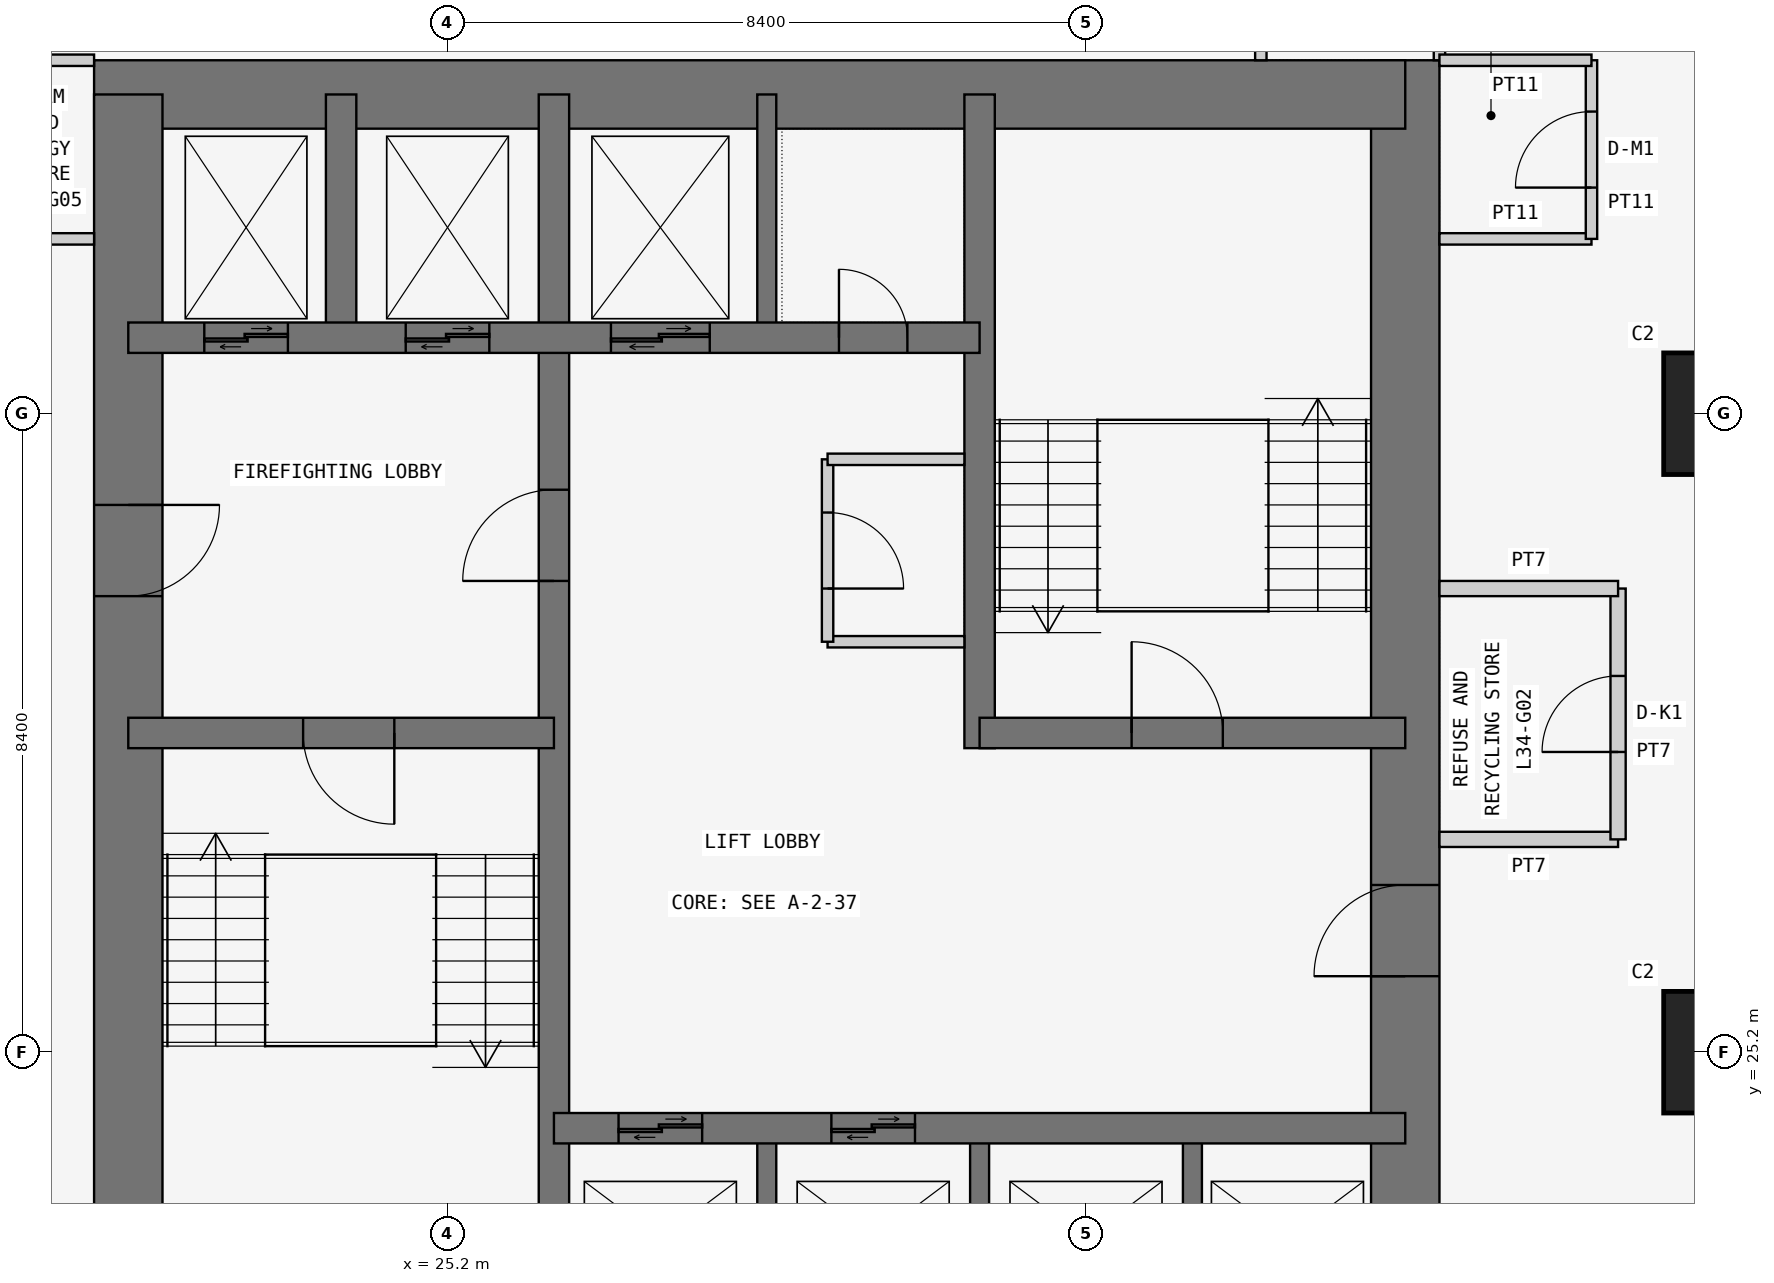
"""IFC4 building model, lengths in metres.
Left out: names, types, materials, properties, quantities, classifications, styles, units other than length and angle.
Written with IfcOpenShell. Run it as: python <this file> out.ifc"""

import sys

from ifc_helpers import new_model, si_unit, direction, frame, frame_2d, origin, origin_2d, place, context, subcontext, project, spatial, rectangle, extrude, element, fill, save


model = new_model("IFC4")
c1 = context("Model", 3, precision=1e-05, world=origin(), true_north=direction((0.0, 1.0)))
c2 = subcontext(c1, "Body", "Model", "MODEL_VIEW")
j1 = project(units=[si_unit("LENGTHUNIT", "METRE"), si_unit("PLANEANGLEUNIT", "RADIAN")], contexts=[c1])
p1 = place(None, origin())
s1 = spatial("IfcSite", under=j1, at=p1, CompositionType="ELEMENT")
p2 = place(p1, origin())
s2 = spatial("IfcBuilding", under=s1, at=p2, CompositionType="ELEMENT")
p3 = place(p2, frame((0.0, 0.0, 134.1)))
s3 = spatial("IfcBuildingStorey", under=s2, at=p3, CompositionType="ELEMENT", Elevation=134.1)
for number, where, z_axis, x_axis in (
    (1, (42.0, 25.2, 0.0), (0.0, 0.0, 1.0), (1.0, 0.0, 0.0)),
    (2, (42.0, 33.6, 0.0), (0.0, 0.0, 1.0), (1.0, 0.0, 0.0)),
):
    element("IfcColumn", number, at=place(p3, frame(where, z_axis=z_axis, x_axis=x_axis)), inside=s3, PredefinedType="COLUMN", context=c2, shape_type="SweptSolid", body=[
        extrude(rectangle(XDim=1.6, YDim=1.6, at=origin_2d()), origin(), (0.0, 0.0, 1.0), 3.6),
    ])
p4 = place(p3, frame((37.8, 21.0, 0.0), z_axis=(0.0, 0.0, 1.0), x_axis=(0.0, 1.0, 0.0)))
e3 = element("IfcWall", 3, at=p4, inside=s3, PredefinedType="SHEAR", context=c2, shape_type="SweptSolid", body=[
    extrude(rectangle(XDim=17.25, YDim=0.9, at=frame_2d((8.625, 0.0))), origin(), (0.0, 0.0, 1.0), 3.6),
])
p5 = place(p4, frame((5.2, 0.0, 0.0)))
e4 = element("IfcOpeningElement", 4, at=p5, cuts=e3, PredefinedType="OPENING", context=c2, shape_type="SweptSolid", body=[
    extrude(rectangle(XDim=1.2, YDim=2.1, at=frame_2d((0.6, 1.05))), frame((0.0, 0.46, 0.0), z_axis=(0.0, -1.0, 0.0), x_axis=(1.0, 0.0, 0.0)), (0.0, 0.0, 1.0), 0.92),
])
p6 = place(p3, frame((37.8, 37.8, 0.0), z_axis=(0.0, 0.0, 1.0), x_axis=(-1.0, 0.0, 0.0)))
e5 = element("IfcWall", 5, at=p6, inside=s3, PredefinedType="SHEAR", context=c2, shape_type="SweptSolid", body=[
    extrude(rectangle(XDim=17.25, YDim=0.9, at=frame_2d((8.625, 0.0))), origin(), (0.0, 0.0, 1.0), 3.6),
])
p7 = place(p3, frame((21.0, 37.8, 0.0), z_axis=(0.0, 0.0, 1.0), x_axis=(0.0, -1.0, 0.0)))
e6 = element("IfcWall", 6, at=p7, inside=s3, PredefinedType="SHEAR", context=c2, shape_type="SweptSolid", body=[
    extrude(rectangle(XDim=17.25, YDim=0.9, at=frame_2d((8.625, 0.0))), origin(), (0.0, 0.0, 1.0), 3.6),
])
p8 = place(p7, frame((5.4, 0.0, 0.0)))
e7 = element("IfcOpeningElement", 7, at=p8, cuts=e6, PredefinedType="OPENING", context=c2, shape_type="SweptSolid", body=[
    extrude(rectangle(XDim=1.2, YDim=2.1, at=frame_2d((0.6, 1.05))), frame((0.0, 0.46, 0.0), z_axis=(0.0, -1.0, 0.0), x_axis=(1.0, 0.0, 0.0)), (0.0, 0.0, 1.0), 0.92),
])
p9 = place(p3, frame((26.6, 21.0, 0.0), z_axis=(0.0, 0.0, 1.0), x_axis=(0.0, 1.0, 0.0)))
e8 = element("IfcWall", 8, at=p9, inside=s3, PredefinedType="SHEAR", context=c2, shape_type="SweptSolid", body=[
    extrude(rectangle(XDim=16.8, YDim=0.4, at=frame_2d((8.4, 0.0))), origin(), (0.0, 0.0, 1.0), 3.6),
])
p10 = place(p9, frame((10.4, 0.0, 0.0)))
e9 = element("IfcOpeningElement", 9, at=p10, cuts=e8, PredefinedType="OPENING", context=c2, shape_type="SweptSolid", body=[
    extrude(rectangle(XDim=1.2, YDim=2.1, at=frame_2d((0.6, 1.05))), frame((0.0, 0.21, 0.0), z_axis=(0.0, -1.0, 0.0), x_axis=(1.0, 0.0, 0.0)), (0.0, 0.0, 1.0), 0.42),
])
p11 = place(p3, frame((21.0, 29.4, 0.0), z_axis=(0.0, 0.0, 1.0), x_axis=(1.0, 0.0, 0.0)))
e10 = element("IfcWall", 10, at=p11, inside=s3, PredefinedType="SHEAR", context=c2, shape_type="SweptSolid", body=[
    extrude(rectangle(XDim=5.6, YDim=0.4, at=frame_2d((2.8, 0.0))), origin(), (0.0, 0.0, 1.0), 3.6),
])
p12 = place(p11, frame((2.3, 0.0, 0.0)))
e11 = element("IfcOpeningElement", 11, at=p12, cuts=e10, PredefinedType="OPENING", context=c2, shape_type="SweptSolid", body=[
    extrude(rectangle(XDim=1.2, YDim=2.1, at=frame_2d((0.6, 1.05))), frame((0.0, 0.21, 0.0), z_axis=(0.0, -1.0, 0.0), x_axis=(1.0, 0.0, 0.0)), (0.0, 0.0, 1.0), 0.42),
])
p13 = place(p3, frame((21.0, 34.6, 0.0), z_axis=(0.0, 0.0, 1.0), x_axis=(1.0, 0.0, 0.0)))
e12 = element("IfcWall", 12, at=p13, inside=s3, PredefinedType="SHEAR", context=c2, shape_type="SweptSolid", body=[
    extrude(rectangle(XDim=11.2, YDim=0.4, at=frame_2d((5.6, 0.0))), origin(), (0.0, 0.0, 1.0), 3.6),
])
p14 = place(p13, frame((9.35, 0.0, 0.0)))
e13 = element("IfcOpeningElement", 13, at=p14, cuts=e12, PredefinedType="OPENING", context=c2, shape_type="SweptSolid", body=[
    extrude(rectangle(XDim=0.9, YDim=2.1, at=frame_2d((0.45, 1.05))), frame((0.0, 0.21, 0.0), z_axis=(0.0, -1.0, 0.0), x_axis=(1.0, 0.0, 0.0)), (0.0, 0.0, 1.0), 0.42),
])
p15 = place(p13, frame((1.0, 0.0, 0.0)))
e14 = element("IfcOpeningElement", 14, at=p15, cuts=e12, PredefinedType="OPENING", context=c2, shape_type="SweptSolid", body=[
    extrude(rectangle(XDim=1.1, YDim=2.1, at=frame_2d((0.55, 1.05))), frame((0.0, 0.21, 0.0), z_axis=(0.0, -1.0, 0.0), x_axis=(1.0, 0.0, 0.0)), (0.0, 0.0, 1.0), 0.42),
])
p16 = place(p13, frame((3.65, 0.0, 0.0)))
e15 = element("IfcOpeningElement", 15, at=p16, cuts=e12, PredefinedType="OPENING", context=c2, shape_type="SweptSolid", body=[
    extrude(rectangle(XDim=1.1, YDim=2.1, at=frame_2d((0.55, 1.05))), frame((0.0, 0.21, 0.0), z_axis=(0.0, -1.0, 0.0), x_axis=(1.0, 0.0, 0.0)), (0.0, 0.0, 1.0), 0.42),
])
p17 = place(p13, frame((6.35, 0.0, 0.0)))
e16 = element("IfcOpeningElement", 16, at=p17, cuts=e12, PredefinedType="OPENING", context=c2, shape_type="SweptSolid", body=[
    extrude(rectangle(XDim=1.3, YDim=2.1, at=frame_2d((0.65, 1.05))), frame((0.0, 0.21, 0.0), z_axis=(0.0, -1.0, 0.0), x_axis=(1.0, 0.0, 0.0)), (0.0, 0.0, 1.0), 0.42),
])
p18 = place(p3, frame((23.8, 34.6, 0.0), z_axis=(0.0, 0.0, 1.0), x_axis=(0.0, 1.0, 0.0)))
e17 = element("IfcWall", 17, at=p18, inside=s3, PredefinedType="SHEAR", context=c2, shape_type="SweptSolid", body=[
    extrude(rectangle(XDim=3.2, YDim=0.4, at=frame_2d((1.6, 0.0))), origin(), (0.0, 0.0, 1.0), 3.6),
])
p19 = place(p3, frame((26.6, 24.2, 0.0), z_axis=(0.0, 0.0, 1.0), x_axis=(1.0, 0.0, 0.0)))
e18 = element("IfcWall", 18, at=p19, inside=s3, PredefinedType="SHEAR", context=c2, shape_type="SweptSolid", body=[
    extrude(rectangle(XDim=11.2, YDim=0.4, at=frame_2d((5.6, 0.0))), origin(), (0.0, 0.0, 1.0), 3.6),
])
p20 = place(p19, frame((0.85, 0.0, 0.0)))
e19 = element("IfcOpeningElement", 19, at=p20, cuts=e18, PredefinedType="OPENING", context=c2, shape_type="SweptSolid", body=[
    extrude(rectangle(XDim=1.1, YDim=2.1, at=frame_2d((0.55, 1.05))), frame((0.0, 0.21, 0.0), z_axis=(0.0, -1.0, 0.0), x_axis=(1.0, 0.0, 0.0)), (0.0, 0.0, 1.0), 0.42),
])
p21 = place(p19, frame((3.65, 0.0, 0.0)))
e20 = element("IfcOpeningElement", 20, at=p21, cuts=e18, PredefinedType="OPENING", context=c2, shape_type="SweptSolid", body=[
    extrude(rectangle(XDim=1.1, YDim=2.1, at=frame_2d((0.55, 1.05))), frame((0.0, 0.21, 0.0), z_axis=(0.0, -1.0, 0.0), x_axis=(1.0, 0.0, 0.0)), (0.0, 0.0, 1.0), 0.42),
])
p22 = place(p3, frame((32.2, 29.2, 0.0), z_axis=(0.0, 0.0, 1.0), x_axis=(0.0, 1.0, 0.0)))
e21 = element("IfcWall", 21, at=p22, inside=s3, PredefinedType="SHEAR", context=c2, shape_type="SweptSolid", body=[
    extrude(rectangle(XDim=8.6, YDim=0.4, at=frame_2d((4.3, 0.0))), origin(), (0.0, 0.0, 1.0), 3.6),
])
p23 = place(p3, frame((32.2, 29.4, 0.0), z_axis=(0.0, 0.0, 1.0), x_axis=(1.0, 0.0, 0.0)))
e22 = element("IfcWall", 22, at=p23, inside=s3, PredefinedType="SHEAR", context=c2, shape_type="SweptSolid", body=[
    extrude(rectangle(XDim=5.6, YDim=0.4, at=frame_2d((2.8, 0.0))), origin(), (0.0, 0.0, 1.0), 3.6),
])
p24 = place(p23, frame((2.0, 0.0, 0.0)))
e23 = element("IfcOpeningElement", 23, at=p24, cuts=e22, PredefinedType="OPENING", context=c2, shape_type="SweptSolid", body=[
    extrude(rectangle(XDim=1.2, YDim=2.1, at=frame_2d((0.6, 1.05))), frame((0.0, 0.21, 0.0), z_axis=(0.0, -1.0, 0.0), x_axis=(1.0, 0.0, 0.0)), (0.0, 0.0, 1.0), 0.42),
])
for number, where, z_axis, x_axis in (
    (24, (29.4, 21.0, 0.0), (0.0, 0.0, 1.0), (0.0, 1.0, 0.0)),
    (25, (32.2, 21.0, 0.0), (0.0, 0.0, 1.0), (0.0, 1.0, 0.0)),
    (26, (35.0, 21.0, 0.0), (0.0, 0.0, 1.0), (0.0, 1.0, 0.0)),
    (27, (29.4, 34.6, 0.0), (0.0, 0.0, 1.0), (0.0, 1.0, 0.0)),
):
    element("IfcWall", number, at=place(p3, frame(where, z_axis=z_axis, x_axis=x_axis)), inside=s3, PredefinedType="SHEAR", context=c2, shape_type="SweptSolid", body=[
        extrude(rectangle(XDim=3.2, YDim=0.25, at=frame_2d((1.6, 0.0))), origin(), (0.0, 0.0, 1.0), 3.6),
    ])
for number, where, z_axis, x_axis in (
    (28, (38.25, 38.25, 0.0), (0.0, 0.0, 1.0), (0.0, 1.0, 0.0)),
    (29, (35.9, 40.6, 0.0), (0.0, 0.0, 1.0), (0.0, -1.0, 0.0)),
):
    element("IfcWall", number, at=place(p3, frame(where, z_axis=z_axis, x_axis=x_axis)), inside=s3, PredefinedType="PARTITIONING", context=c2, shape_type="SweptSolid", body=[
        extrude(rectangle(XDim=2.35, YDim=0.15, at=frame_2d((1.175, 0.0))), origin(), (0.0, 0.0, 1.0), 3.45),
    ])
p25 = place(p3, frame((38.25, 28.0, 0.0), z_axis=(0.0, 0.0, 1.0), x_axis=(1.0, 0.0, 0.0)))
e30 = element("IfcWall", 30, at=p25, inside=s3, PredefinedType="PARTITIONING", context=c2, shape_type="SweptSolid", body=[
    extrude(rectangle(XDim=2.35, YDim=0.2, at=frame_2d((1.175, 0.0))), origin(), (0.0, 0.0, 1.0), 3.45),
])
p26 = place(p3, frame((40.6, 28.0, 0.0), z_axis=(0.0, 0.0, 1.0), x_axis=(0.0, 1.0, 0.0)))
e31 = element("IfcWall", 31, at=p26, inside=s3, PredefinedType="PARTITIONING", context=c2, shape_type="SweptSolid", body=[
    extrude(rectangle(XDim=3.3, YDim=0.2, at=frame_2d((1.65, 0.0))), origin(), (0.0, 0.0, 1.0), 3.45),
])
p27 = place(p26, frame((1.15, 0.0, 0.0)))
e32 = element("IfcOpeningElement", 32, at=p27, cuts=e31, PredefinedType="OPENING", context=c2, shape_type="SweptSolid", body=[
    extrude(rectangle(XDim=1.0, YDim=2.1, at=frame_2d((0.5, 1.05))), frame((0.0, 0.11, 0.0), z_axis=(0.0, -1.0, 0.0), x_axis=(1.0, 0.0, 0.0)), (0.0, 0.0, 1.0), 0.22),
])
p28 = place(p3, frame((40.6, 31.3, 0.0), z_axis=(0.0, 0.0, 1.0), x_axis=(-1.0, 0.0, 0.0)))
e33 = element("IfcWall", 33, at=p28, inside=s3, PredefinedType="PARTITIONING", context=c2, shape_type="SweptSolid", body=[
    extrude(rectangle(XDim=2.35, YDim=0.2, at=frame_2d((1.175, 0.0))), origin(), (0.0, 0.0, 1.0), 3.45),
])
p29 = place(p3, frame((38.25, 35.9, 0.0), z_axis=(0.0, 0.0, 1.0), x_axis=(1.0, 0.0, 0.0)))
e34 = element("IfcWall", 34, at=p29, inside=s3, PredefinedType="PARTITIONING", context=c2, shape_type="SweptSolid", body=[
    extrude(rectangle(XDim=2.0, YDim=0.15, at=frame_2d((1.0, 0.0))), origin(), (0.0, 0.0, 1.0), 3.45),
])
p30 = place(p3, frame((40.25, 35.9, 0.0), z_axis=(0.0, 0.0, 1.0), x_axis=(0.0, 1.0, 0.0)))
e35 = element("IfcWall", 35, at=p30, inside=s3, PredefinedType="PARTITIONING", context=c2, shape_type="SweptSolid", body=[
    extrude(rectangle(XDim=2.35, YDim=0.15, at=frame_2d((1.175, 0.0))), origin(), (0.0, 0.0, 1.0), 3.45),
])
p31 = place(p30, frame((0.675, 0.0, 0.0)))
e36 = element("IfcOpeningElement", 36, at=p31, cuts=e35, PredefinedType="OPENING", context=c2, shape_type="SweptSolid", body=[
    extrude(rectangle(XDim=1.0, YDim=2.1, at=frame_2d((0.5, 1.05))), frame((0.0, 0.085, 0.0), z_axis=(0.0, -1.0, 0.0), x_axis=(1.0, 0.0, 0.0)), (0.0, 0.0, 1.0), 0.17),
])
p32 = place(p3, frame((40.25, 38.25, 0.0), z_axis=(0.0, 0.0, 1.0), x_axis=(-1.0, 0.0, 0.0)))
e37 = element("IfcWall", 37, at=p32, inside=s3, PredefinedType="PARTITIONING", context=c2, shape_type="SweptSolid", body=[
    extrude(rectangle(XDim=2.0, YDim=0.15, at=frame_2d((1.0, 0.0))), origin(), (0.0, 0.0, 1.0), 3.45),
])
for number, where, z_axis, x_axis in (
    (38, (20.55, 38.25, 0.0), (0.0, 0.0, 1.0), (-1.0, 0.0, 0.0)),
    (39, (18.2, 35.9, 0.0), (0.0, 0.0, 1.0), (1.0, 0.0, 0.0)),
):
    element("IfcWall", number, at=place(p3, frame(where, z_axis=z_axis, x_axis=x_axis)), inside=s3, PredefinedType="PARTITIONING", context=c2, shape_type="SweptSolid", body=[
        extrude(rectangle(XDim=2.35, YDim=0.15, at=frame_2d((1.175, 0.0))), origin(), (0.0, 0.0, 1.0), 3.45),
    ])
p33 = place(p3, frame((32.0, 30.6, 0.0), z_axis=(0.0, 0.0, 1.0), x_axis=(-1.0, 0.0, 0.0)))
e40 = element("IfcWall", 40, at=p33, inside=s3, PredefinedType="PARTITIONING", context=c2, shape_type="SweptSolid", body=[
    extrude(rectangle(XDim=1.8, YDim=0.15, at=frame_2d((0.9, 0.0))), origin(), (0.0, 0.0, 1.0), 3.45),
])
p34 = place(p3, frame((30.2, 30.6, 0.0), z_axis=(0.0, 0.0, 1.0), x_axis=(0.0, 1.0, 0.0)))
e41 = element("IfcWall", 41, at=p34, inside=s3, PredefinedType="PARTITIONING", context=c2, shape_type="SweptSolid", body=[
    extrude(rectangle(XDim=2.4, YDim=0.15, at=frame_2d((1.2, 0.0))), origin(), (0.0, 0.0, 1.0), 3.45),
])
p35 = place(p34, frame((0.7, 0.0, 0.0)))
e42 = element("IfcOpeningElement", 42, at=p35, cuts=e41, PredefinedType="OPENING", context=c2, shape_type="SweptSolid", body=[
    extrude(rectangle(XDim=1.0, YDim=2.1, at=frame_2d((0.5, 1.05))), frame((0.0, 0.085, 0.0), z_axis=(0.0, -1.0, 0.0), x_axis=(1.0, 0.0, 0.0)), (0.0, 0.0, 1.0), 0.17),
])
p36 = place(p3, frame((30.2, 33.0, 0.0), z_axis=(0.0, 0.0, 1.0), x_axis=(1.0, 0.0, 0.0)))
e43 = element("IfcWall", 43, at=p36, inside=s3, PredefinedType="PARTITIONING", context=c2, shape_type="SweptSolid", body=[
    extrude(rectangle(XDim=1.8, YDim=0.15, at=frame_2d((0.9, 0.0))), origin(), (0.0, 0.0, 1.0), 3.45),
])
p37 = place(p27, origin())
e44 = element("IfcDoor", 44, at=p37, inside=s3, OperationType="SINGLE_SWING_LEFT", PredefinedType="DOOR", context=c2, shape_type="SweptSolid", body=[
    extrude(rectangle(XDim=1.0, YDim=2.1, at=frame_2d((0.5, 1.05))), frame((0.0, 0.025, 0.0), z_axis=(0.0, -1.0, 0.0), x_axis=(1.0, 0.0, 0.0)), (0.0, 0.0, 1.0), 0.05),
])
fill(e32, e44)
p38 = place(p31, origin())
e45 = element("IfcDoor", 45, at=p38, inside=s3, OperationType="SINGLE_SWING_LEFT", PredefinedType="DOOR", context=c2, shape_type="SweptSolid", body=[
    extrude(rectangle(XDim=1.0, YDim=2.1, at=frame_2d((0.5, 1.05))), frame((0.0, 0.025, 0.0), z_axis=(0.0, -1.0, 0.0), x_axis=(1.0, 0.0, 0.0)), (0.0, 0.0, 1.0), 0.05),
])
fill(e36, e45)
p39 = place(p8, origin())
e46 = element("IfcDoor", 46, at=p39, inside=s3, OperationType="SINGLE_SWING_LEFT", PredefinedType="DOOR", context=c2, shape_type="SweptSolid", body=[
    extrude(rectangle(XDim=1.2, YDim=2.1, at=frame_2d((0.6, 1.05))), frame((0.0, 0.025, 0.0), z_axis=(0.0, -1.0, 0.0), x_axis=(1.0, 0.0, 0.0)), (0.0, 0.0, 1.0), 0.05),
])
fill(e7, e46)
p40 = place(p12, frame((1.2, 0.0, 0.0), z_axis=(0.0, 0.0, 1.0), x_axis=(-1.0, 0.0, 0.0)))
e47 = element("IfcDoor", 47, at=p40, inside=s3, OperationType="SINGLE_SWING_LEFT", PredefinedType="DOOR", context=c2, shape_type="SweptSolid", body=[
    extrude(rectangle(XDim=1.2, YDim=2.1, at=frame_2d((0.6, 1.05))), frame((0.0, 0.025, 0.0), z_axis=(0.0, -1.0, 0.0), x_axis=(1.0, 0.0, 0.0)), (0.0, 0.0, 1.0), 0.05),
])
fill(e11, e47)
p41 = place(p10, origin())
e48 = element("IfcDoor", 48, at=p41, inside=s3, OperationType="SINGLE_SWING_LEFT", PredefinedType="DOOR", context=c2, shape_type="SweptSolid", body=[
    extrude(rectangle(XDim=1.2, YDim=2.1, at=frame_2d((0.6, 1.05))), frame((0.0, 0.025, 0.0), z_axis=(0.0, -1.0, 0.0), x_axis=(1.0, 0.0, 0.0)), (0.0, 0.0, 1.0), 0.05),
])
fill(e9, e48)
p42 = place(p5, origin())
e49 = element("IfcDoor", 49, at=p42, inside=s3, OperationType="SINGLE_SWING_LEFT", PredefinedType="DOOR", context=c2, shape_type="SweptSolid", body=[
    extrude(rectangle(XDim=1.2, YDim=2.1, at=frame_2d((0.6, 1.05))), frame((0.0, 0.025, 0.0), z_axis=(0.0, -1.0, 0.0), x_axis=(1.0, 0.0, 0.0)), (0.0, 0.0, 1.0), 0.05),
])
fill(e4, e49)
p43 = place(p24, origin())
e50 = element("IfcDoor", 50, at=p43, inside=s3, OperationType="SINGLE_SWING_LEFT", PredefinedType="DOOR", context=c2, shape_type="SweptSolid", body=[
    extrude(rectangle(XDim=1.2, YDim=2.1, at=frame_2d((0.6, 1.05))), frame((0.0, 0.025, 0.0), z_axis=(0.0, -1.0, 0.0), x_axis=(1.0, 0.0, 0.0)), (0.0, 0.0, 1.0), 0.05),
])
fill(e23, e50)
p44 = place(p14, origin())
e51 = element("IfcDoor", 51, at=p44, inside=s3, OperationType="SINGLE_SWING_LEFT", PredefinedType="DOOR", context=c2, shape_type="SweptSolid", body=[
    extrude(rectangle(XDim=0.9, YDim=2.1, at=frame_2d((0.45, 1.05))), frame((0.0, 0.025, 0.0), z_axis=(0.0, -1.0, 0.0), x_axis=(1.0, 0.0, 0.0)), (0.0, 0.0, 1.0), 0.05),
])
fill(e13, e51)
p45 = place(p35, frame((1.0, 0.0, 0.0), z_axis=(0.0, 0.0, 1.0), x_axis=(-1.0, 0.0, 0.0)))
e52 = element("IfcDoor", 52, at=p45, inside=s3, OperationType="SINGLE_SWING_RIGHT", PredefinedType="DOOR", context=c2, shape_type="SweptSolid", body=[
    extrude(rectangle(XDim=1.0, YDim=2.1, at=frame_2d((0.5, 1.05))), frame((0.0, 0.025, 0.0), z_axis=(0.0, -1.0, 0.0), x_axis=(1.0, 0.0, 0.0)), (0.0, 0.0, 1.0), 0.05),
])
fill(e42, e52)
p46 = place(p20, origin())
e53 = element("IfcDoor", 53, at=p46, inside=s3, OperationType="DOUBLE_DOOR_SLIDING", PredefinedType="DOOR", context=c2, shape_type="SweptSolid", body=[
    extrude(rectangle(XDim=1.1, YDim=2.1, at=frame_2d((0.55, 1.05))), frame((0.0, 0.025, 0.0), z_axis=(0.0, -1.0, 0.0), x_axis=(1.0, 0.0, 0.0)), (0.0, 0.0, 1.0), 0.05),
])
fill(e19, e53)
p47 = place(p21, origin())
e54 = element("IfcDoor", 54, at=p47, inside=s3, OperationType="DOUBLE_DOOR_SLIDING", PredefinedType="DOOR", context=c2, shape_type="SweptSolid", body=[
    extrude(rectangle(XDim=1.1, YDim=2.1, at=frame_2d((0.55, 1.05))), frame((0.0, 0.025, 0.0), z_axis=(0.0, -1.0, 0.0), x_axis=(1.0, 0.0, 0.0)), (0.0, 0.0, 1.0), 0.05),
])
fill(e20, e54)
p48 = place(p15, origin())
e55 = element("IfcDoor", 55, at=p48, inside=s3, OperationType="DOUBLE_DOOR_SLIDING", PredefinedType="DOOR", context=c2, shape_type="SweptSolid", body=[
    extrude(rectangle(XDim=1.1, YDim=2.1, at=frame_2d((0.55, 1.05))), frame((0.0, 0.025, 0.0), z_axis=(0.0, -1.0, 0.0), x_axis=(1.0, 0.0, 0.0)), (0.0, 0.0, 1.0), 0.05),
])
fill(e14, e55)
p49 = place(p16, origin())
e56 = element("IfcDoor", 56, at=p49, inside=s3, OperationType="DOUBLE_DOOR_SLIDING", PredefinedType="DOOR", context=c2, shape_type="SweptSolid", body=[
    extrude(rectangle(XDim=1.1, YDim=2.1, at=frame_2d((0.55, 1.05))), frame((0.0, 0.025, 0.0), z_axis=(0.0, -1.0, 0.0), x_axis=(1.0, 0.0, 0.0)), (0.0, 0.0, 1.0), 0.05),
])
fill(e15, e56)
p50 = place(p17, origin())
e57 = element("IfcDoor", 57, at=p50, inside=s3, OperationType="DOUBLE_DOOR_SLIDING", PredefinedType="DOOR", context=c2, shape_type="SweptSolid", body=[
    extrude(rectangle(XDim=1.3, YDim=2.1, at=frame_2d((0.65, 1.05))), frame((0.0, 0.025, 0.0), z_axis=(0.0, -1.0, 0.0), x_axis=(1.0, 0.0, 0.0)), (0.0, 0.0, 1.0), 0.05),
])
fill(e16, e57)
save(model, sys.argv[1])
